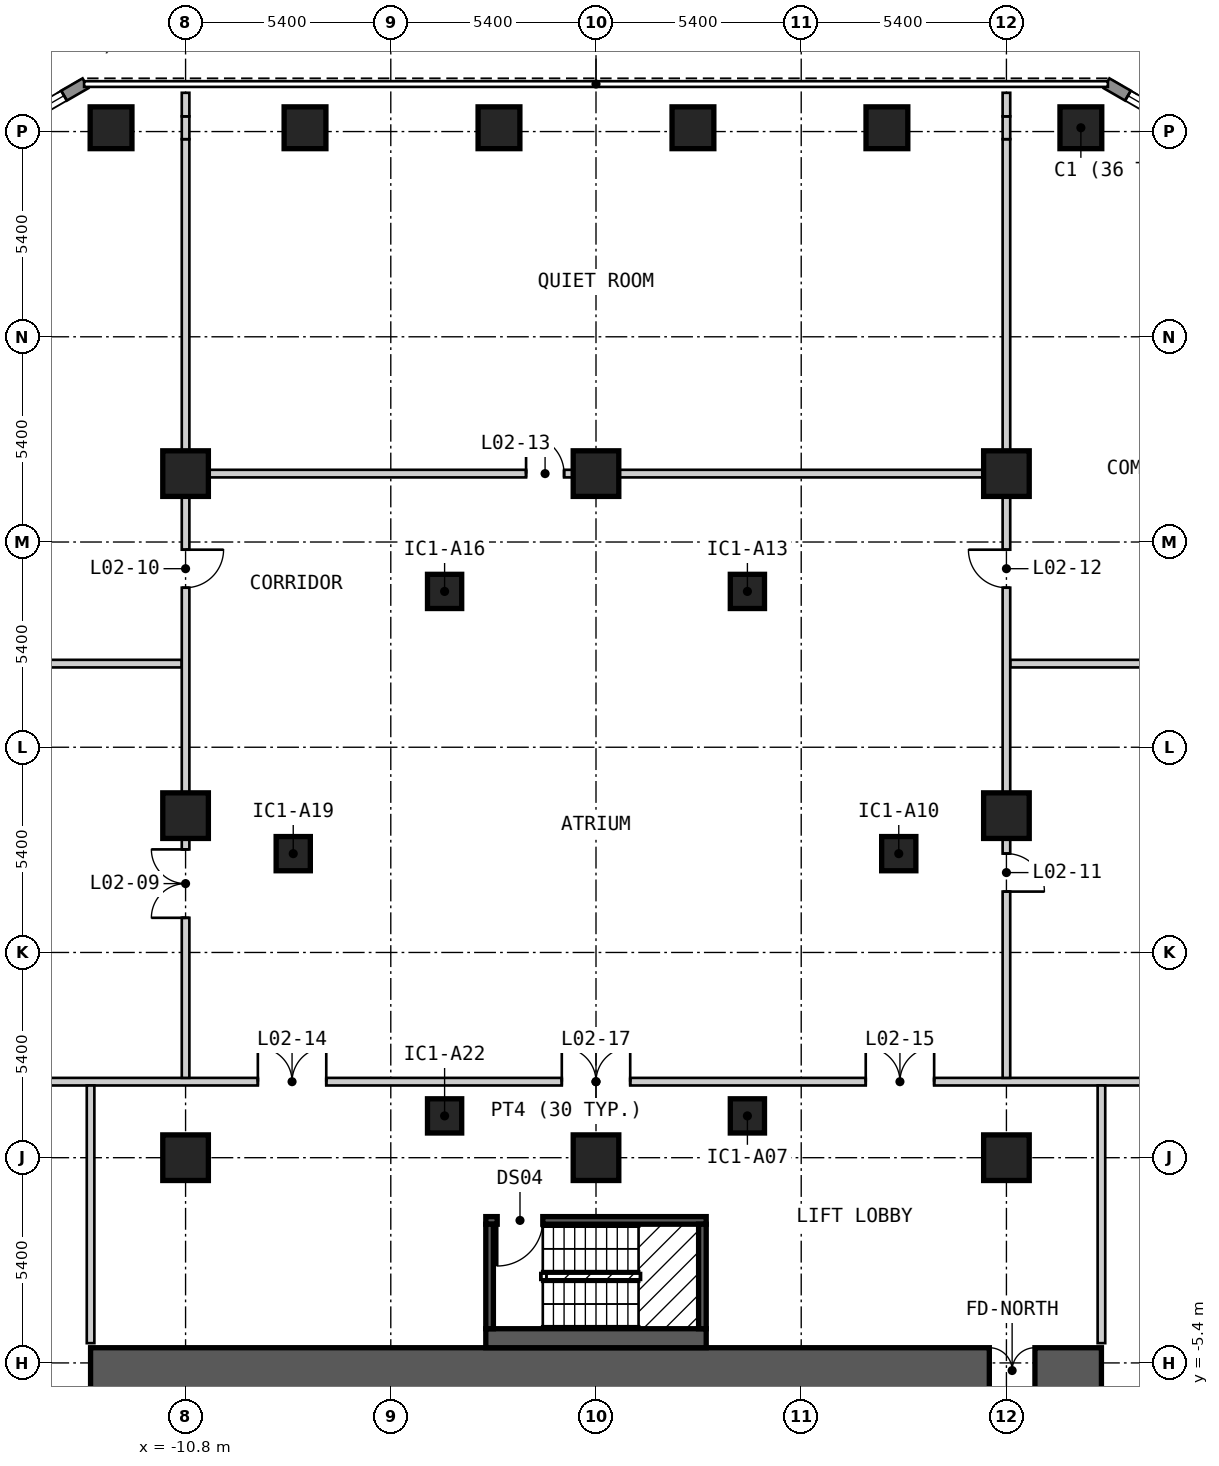
"""IFC4 building model, lengths in metres.
Left out: names, types, materials, properties, quantities, classifications, styles, units other than length and angle.
Written with IfcOpenShell. Run it as: python <this file> out.ifc"""

import sys

from ifc_helpers import new_model, si_unit, direction, frame, frame_2d, origin, origin_2d, place, context, subcontext, project, spatial, polyline, rectangle, outline, extrude, element, fill, save


model = new_model("IFC4")
c1 = context("Model", 3, precision=1e-05, world=origin(), true_north=direction((0.0, 1.0)))
c2 = subcontext(c1, "Body", "Model", "MODEL_VIEW")
j1 = project(units=[si_unit("LENGTHUNIT", "METRE"), si_unit("PLANEANGLEUNIT", "RADIAN")], contexts=[c1])
p1 = place(None, origin())
s1 = spatial("IfcSite", under=j1, at=p1, CompositionType="ELEMENT")
p2 = place(p1, origin())
s2 = spatial("IfcBuilding", under=s1, at=p2, CompositionType="ELEMENT")
p3 = place(p2, frame((0.0, 0.0, 9.0)))
s3 = spatial("IfcBuildingStorey", under=s2, at=p3, CompositionType="ELEMENT", Elevation=9.0)
for number, where, z_axis, x_axis in (
    (1, (12.759, 27.1, 0.0), (0.0, 0.0, 1.0), (-1.0, 0.0, 0.0)),
    (2, (7.655, 27.1, 0.0), (0.0, 0.0, 1.0), (-1.0, 0.0, 0.0)),
    (3, (2.551, 27.1, 0.0), (0.0, 0.0, 1.0), (-1.0, 0.0, 0.0)),
    (4, (-2.553, 27.1, 0.0), (0.0, 0.0, 1.0), (-1.0, 0.0, 0.0)),
    (5, (-7.657, 27.1, 0.0), (0.0, 0.0, 1.0), (-1.0, 0.0, 0.0)),
    (6, (-12.761, 27.1, 0.0), (0.0, 0.0, 1.0), (-1.0, 0.0, 0.0)),
):
    element("IfcColumn", number, at=place(p3, frame(where, z_axis=z_axis, x_axis=x_axis)), inside=s3, PredefinedType="COLUMN", context=c2, shape_type="SweptSolid", body=[
        extrude(rectangle(XDim=1.1, YDim=1.1, at=origin_2d()), origin(), (0.0, 0.0, 1.0), 3.6),
    ])
for number, where, z_axis, x_axis in (
    (7, (3.984, 1.1, 0.0), (0.0, 0.0, 1.0), (1.0, 0.0, 0.0)),
    (8, (7.967, 8.0, 0.0), (0.0, 0.0, 1.0), (1.0, 0.0, 0.0)),
    (9, (3.984, 14.9, 0.0), (0.0, 0.0, 1.0), (1.0, 0.0, 0.0)),
    (10, (-3.984, 14.9, 0.0), (0.0, 0.0, 1.0), (1.0, 0.0, 0.0)),
    (11, (-7.967, 8.0, 0.0), (0.0, 0.0, 1.0), (1.0, 0.0, 0.0)),
    (12, (-3.984, 1.1, 0.0), (0.0, 0.0, 1.0), (1.0, 0.0, 0.0)),
):
    element("IfcColumn", number, at=place(p3, frame(where, z_axis=z_axis, x_axis=x_axis)), inside=s3, PredefinedType="COLUMN", context=c2, shape_type="SweptSolid", body=[
        extrude(rectangle(XDim=0.9, YDim=0.9, at=origin_2d()), origin(), (0.0, 0.0, 1.0), 3.6),
    ])
for number, where, z_axis, x_axis in (
    (13, (-10.8, 0.0, 0.0), (0.0, 0.0, 1.0), (1.0, 0.0, 0.0)),
    (14, (-10.8, 9.0, 0.0), (0.0, 0.0, 1.0), (1.0, 0.0, 0.0)),
    (15, (-10.8, 18.0, 0.0), (0.0, 0.0, 1.0), (1.0, 0.0, 0.0)),
    (16, (0.0, 0.0, 0.0), (0.0, 0.0, 1.0), (1.0, 0.0, 0.0)),
    (17, (0.0, 18.0, 0.0), (0.0, 0.0, 1.0), (1.0, 0.0, 0.0)),
    (18, (10.8, 0.0, 0.0), (0.0, 0.0, 1.0), (1.0, 0.0, 0.0)),
    (19, (10.8, 9.0, 0.0), (0.0, 0.0, 1.0), (1.0, 0.0, 0.0)),
    (20, (10.8, 18.0, 0.0), (0.0, 0.0, 1.0), (1.0, 0.0, 0.0)),
):
    element("IfcColumn", number, at=place(p3, frame(where, z_axis=z_axis, x_axis=x_axis)), inside=s3, PredefinedType="COLUMN", context=c2, shape_type="SweptSolid", body=[
        extrude(rectangle(XDim=1.2, YDim=1.2, at=origin_2d()), origin(), (0.0, 0.0, 1.0), 3.6),
    ])
p4 = place(p3, frame((-13.3, -5.6, 0.0), z_axis=(0.0, 0.0, 1.0), x_axis=(1.0, 0.0, 0.0)))
e21 = element("IfcWall", 21, at=p4, inside=s3, PredefinedType="SHEAR", context=c2, shape_type="SweptSolid", body=[
    extrude(rectangle(XDim=26.6, YDim=1.2, at=frame_2d((13.3, 0.0))), origin(), (0.0, 0.0, 1.0), 3.25),
])
p5 = place(p4, frame((23.65, 0.0, 0.0)))
e22 = element("IfcOpeningElement", 22, at=p5, cuts=e21, PredefinedType="OPENING", context=c2, shape_type="SweptSolid", body=[
    extrude(rectangle(XDim=1.2, YDim=2.1, at=frame_2d((0.6, 1.05))), frame((0.0, 0.61, 0.0), z_axis=(0.0, -1.0, 0.0), x_axis=(1.0, 0.0, 0.0)), (0.0, 0.0, 1.0), 1.22),
])
p6 = place(p3, frame((-13.435, 28.27, 0.0), z_axis=(0.0, 0.0, 1.0), x_axis=(-0.866010750942, -0.50002537861, 0.0)))
e23 = element("IfcWall", 23, at=p6, inside=s3, PredefinedType="SOLIDWALL", context=c2, shape_type="SweptSolid", body=[
    extrude(outline(polyline([(0.0, -0.15), (5.0, -0.15), (4.919, 0.15), (0.08, 0.15), (0.0, -0.15)])), origin(), (0.0, 0.0, 1.0), 3.25),
])
p7 = place(p6, frame((0.65, 0.0, 0.15)))
e24 = element("IfcOpeningElement", 24, at=p7, cuts=e23, PredefinedType="OPENING", context=c2, shape_type="SweptSolid", body=[
    extrude(rectangle(XDim=1.2, YDim=2.1, at=frame_2d((0.6, 1.05))), frame((0.0, 0.16, 0.0), z_axis=(0.0, -1.0, 0.0), x_axis=(1.0, 0.0, 0.0)), (0.0, 0.0, 1.0), 0.32),
])
p8 = place(p6, frame((3.149, 0.0, 0.15)))
e25 = element("IfcOpeningElement", 25, at=p8, cuts=e23, PredefinedType="OPENING", context=c2, shape_type="SweptSolid", body=[
    extrude(rectangle(XDim=1.2, YDim=2.1, at=frame_2d((0.6, 1.05))), frame((0.0, 0.16, 0.0), z_axis=(0.0, -1.0, 0.0), x_axis=(1.0, 0.0, 0.0)), (0.0, 0.0, 1.0), 0.32),
])
p9 = place(p3, frame((17.765, 25.77, 0.0), z_axis=(0.0, 0.0, 1.0), x_axis=(-0.866010750942, 0.50002537861, 0.0)))
e26 = element("IfcWall", 26, at=p9, inside=s3, PredefinedType="SOLIDWALL", context=c2, shape_type="SweptSolid", body=[
    extrude(outline(polyline([(0.0, -0.15), (5.0, -0.15), (4.919, 0.15), (0.08, 0.15), (0.0, -0.15)])), origin(), (0.0, 0.0, 1.0), 3.25),
])
p10 = place(p9, frame((0.65, 0.0, 0.15)))
e27 = element("IfcOpeningElement", 27, at=p10, cuts=e26, PredefinedType="OPENING", context=c2, shape_type="SweptSolid", body=[
    extrude(rectangle(XDim=1.2, YDim=2.1, at=frame_2d((0.6, 1.05))), frame((0.0, 0.16, 0.0), z_axis=(0.0, -1.0, 0.0), x_axis=(1.0, 0.0, 0.0)), (0.0, 0.0, 1.0), 0.32),
])
p11 = place(p9, frame((3.15, 0.0, 0.15)))
e28 = element("IfcOpeningElement", 28, at=p11, cuts=e26, PredefinedType="OPENING", context=c2, shape_type="SweptSolid", body=[
    extrude(rectangle(XDim=1.2, YDim=2.1, at=frame_2d((0.6, 1.05))), frame((0.0, 0.16, 0.0), z_axis=(0.0, -1.0, 0.0), x_axis=(1.0, 0.0, 0.0)), (0.0, 0.0, 1.0), 0.32),
])
p12 = place(p3, frame((-2.9, -4.75, 0.0), z_axis=(0.0, 0.0, 1.0), x_axis=(1.0, 0.0, 0.0)))
e29 = element("IfcWall", 29, at=p12, inside=s3, PredefinedType="SOLIDWALL", context=c2, shape_type="SweptSolid", body=[
    extrude(rectangle(XDim=5.8, YDim=0.5, at=frame_2d((2.9, 0.0))), origin(), (0.0, 0.0, 1.0), 3.25),
])
p13 = place(p3, frame((-2.9, -1.65, 0.0), z_axis=(0.0, 0.0, 1.0), x_axis=(1.0, 0.0, 0.0)))
e30 = element("IfcWall", 30, at=p13, inside=s3, PredefinedType="SOLIDWALL", context=c2, shape_type="SweptSolid", body=[
    extrude(rectangle(XDim=5.8, YDim=0.2, at=frame_2d((2.9, 0.0))), origin(), (0.0, 0.0, 1.0), 3.25),
])
p14 = place(p13, frame((0.3, 0.0, 0.0)))
e31 = element("IfcOpeningElement", 31, at=p14, cuts=e30, PredefinedType="OPENING", context=c2, shape_type="SweptSolid", body=[
    extrude(rectangle(XDim=1.2, YDim=2.1, at=frame_2d((0.6, 1.05))), frame((0.0, 0.11, 0.0), z_axis=(0.0, -1.0, 0.0), x_axis=(1.0, 0.0, 0.0)), (0.0, 0.0, 1.0), 0.22),
])
for number, where, z_axis, x_axis in (
    (32, (-2.8, -4.5, 0.0), (0.0, 0.0, 1.0), (0.0, 1.0, 0.0)),
    (33, (2.8, -4.5, 0.0), (0.0, 0.0, 1.0), (0.0, 1.0, 0.0)),
):
    element("IfcWall", number, at=place(p3, frame(where, z_axis=z_axis, x_axis=x_axis)), inside=s3, PredefinedType="SOLIDWALL", context=c2, shape_type="SweptSolid", body=[
        extrude(rectangle(XDim=2.75, YDim=0.2, at=frame_2d((1.375, 0.0))), origin(), (0.0, 0.0, 1.0), 3.25),
    ])
p15 = place(p3, frame((-29.549, 2.0, 0.0), z_axis=(0.0, 0.0, 1.0), x_axis=(1.0, 0.0, 0.0)))
e34 = element("IfcWall", 34, at=p15, inside=s3, PredefinedType="PARTITIONING", context=c2, shape_type="SweptSolid", body=[
    extrude(rectangle(XDim=59.097, YDim=0.2, at=frame_2d((29.549, 0.0))), origin(), (0.0, 0.0, 1.0), 3.25),
])
p16 = place(p15, frame((20.651, 0.0, 0.0)))
e35 = element("IfcOpeningElement", 35, at=p16, cuts=e34, PredefinedType="OPENING", context=c2, shape_type="SweptSolid", body=[
    extrude(rectangle(XDim=1.8, YDim=2.1, at=frame_2d((0.9, 1.05))), frame((0.0, 0.11, 0.0), z_axis=(0.0, -1.0, 0.0), x_axis=(1.0, 0.0, 0.0)), (0.0, 0.0, 1.0), 0.22),
])
p17 = place(p15, frame((36.647, 0.0, 0.0)))
e36 = element("IfcOpeningElement", 36, at=p17, cuts=e34, PredefinedType="OPENING", context=c2, shape_type="SweptSolid", body=[
    extrude(rectangle(XDim=1.8, YDim=2.1, at=frame_2d((0.9, 1.05))), frame((0.0, 0.11, 0.0), z_axis=(0.0, -1.0, 0.0), x_axis=(1.0, 0.0, 0.0)), (0.0, 0.0, 1.0), 0.22),
])
p18 = place(p15, frame((28.649, 0.0, 0.0)))
e37 = element("IfcOpeningElement", 37, at=p18, cuts=e34, PredefinedType="OPENING", context=c2, shape_type="SweptSolid", body=[
    extrude(rectangle(XDim=1.8, YDim=2.1, at=frame_2d((0.9, 1.05))), frame((0.0, 0.11, 0.0), z_axis=(0.0, -1.0, 0.0), x_axis=(1.0, 0.0, 0.0)), (0.0, 0.0, 1.0), 0.22),
])
for number, where, z_axis, x_axis in (
    (38, (-23.383, 13.0, 0.0), (0.0, 0.0, 1.0), (1.0, 0.0, 0.0)),
    (39, (10.9, 13.0, 0.0), (0.0, 0.0, 1.0), (1.0, 0.0, 0.0)),
):
    element("IfcWall", number, at=place(p3, frame(where, z_axis=z_axis, x_axis=x_axis)), inside=s3, PredefinedType="PARTITIONING", context=c2, shape_type="SweptSolid", body=[
        extrude(rectangle(XDim=12.483, YDim=0.2, at=frame_2d((6.242, 0.0))), origin(), (0.0, 0.0, 1.0), 3.25),
    ])
p19 = place(p3, frame((-10.7, 18.0, 0.0), z_axis=(0.0, 0.0, 1.0), x_axis=(1.0, 0.0, 0.0)))
e40 = element("IfcWall", 40, at=p19, inside=s3, PredefinedType="PARTITIONING", context=c2, shape_type="SweptSolid", body=[
    extrude(rectangle(XDim=21.4, YDim=0.2, at=frame_2d((10.7, 0.0))), origin(), (0.0, 0.0, 1.0), 3.25),
])
p20 = place(p19, frame((8.86, 0.0, 0.0)))
e41 = element("IfcOpeningElement", 41, at=p20, cuts=e40, PredefinedType="OPENING", context=c2, shape_type="SweptSolid", body=[
    extrude(rectangle(XDim=1.0, YDim=2.1, at=frame_2d((0.5, 1.05))), frame((0.0, 0.11, 0.0), z_axis=(0.0, -1.0, 0.0), x_axis=(1.0, 0.0, 0.0)), (0.0, 0.0, 1.0), 0.22),
])
p21 = place(p3, frame((-13.3, -4.88, 0.0), z_axis=(0.0, 0.0, 1.0), x_axis=(0.0, 1.0, 0.0)))
e42 = element("IfcWall", 42, at=p21, inside=s3, PredefinedType="PARTITIONING", context=c2, shape_type="SweptSolid", body=[
    extrude(rectangle(XDim=6.78, YDim=0.2, at=frame_2d((3.39, 0.0))), origin(), (0.0, 0.0, 1.0), 3.25),
])
p22 = place(p3, frame((-10.8, 2.1, 0.0), z_axis=(0.0, 0.0, 1.0), x_axis=(0.0, 1.0, 0.0)))
e43 = element("IfcWall", 43, at=p22, inside=s3, PredefinedType="PARTITIONING", context=c2, shape_type="SweptSolid", body=[
    extrude(rectangle(XDim=24.7, YDim=0.2, at=frame_2d((12.35, 0.0))), origin(), (0.0, 0.0, 1.0), 3.25),
])
p23 = place(p22, frame((4.212, 0.0, 0.0)))
e44 = element("IfcOpeningElement", 44, at=p23, cuts=e43, PredefinedType="OPENING", context=c2, shape_type="SweptSolid", body=[
    extrude(rectangle(XDim=1.8, YDim=2.1, at=frame_2d((0.9, 1.05))), frame((0.0, 0.11, 0.0), z_axis=(0.0, -1.0, 0.0), x_axis=(1.0, 0.0, 0.0)), (0.0, 0.0, 1.0), 0.22),
])
p24 = place(p22, frame((12.898, 0.0, 0.0)))
e45 = element("IfcOpeningElement", 45, at=p24, cuts=e43, PredefinedType="OPENING", context=c2, shape_type="SweptSolid", body=[
    extrude(rectangle(XDim=1.0, YDim=2.1, at=frame_2d((0.5, 1.05))), frame((0.0, 0.11, 0.0), z_axis=(0.0, -1.0, 0.0), x_axis=(1.0, 0.0, 0.0)), (0.0, 0.0, 1.0), 0.22),
])
p25 = place(p3, frame((-10.8, 26.8, 0.0), z_axis=(0.0, 0.0, 1.0), x_axis=(0.0, 1.0, 0.0)))
e46 = element("IfcWall", 46, at=p25, inside=s3, PredefinedType="PARTITIONING", context=c2, shape_type="SweptSolid", body=[
    extrude(rectangle(XDim=0.6, YDim=0.2, at=frame_2d((0.3, 0.0))), origin(), (0.0, 0.0, 1.0), 2.52),
])
p26 = place(p3, frame((-10.8, 27.4, 0.0), z_axis=(0.0, 0.0, 1.0), x_axis=(0.0, 1.0, 0.0)))
e47 = element("IfcWall", 47, at=p26, inside=s3, PredefinedType="PARTITIONING", context=c2, shape_type="SweptSolid", body=[
    extrude(rectangle(XDim=0.62, YDim=0.2, at=frame_2d((0.31, 0.0))), origin(), (0.0, 0.0, 1.0), 3.25),
])
p27 = place(p3, frame((10.8, 2.1, 0.0), z_axis=(0.0, 0.0, 1.0), x_axis=(0.0, 1.0, 0.0)))
e48 = element("IfcWall", 48, at=p27, inside=s3, PredefinedType="PARTITIONING", context=c2, shape_type="SweptSolid", body=[
    extrude(rectangle(XDim=24.7, YDim=0.2, at=frame_2d((12.35, 0.0))), origin(), (0.0, 0.0, 1.0), 3.25),
])
p28 = place(p27, frame((5.902, 0.0, 0.0), z_axis=(0.0, 0.0, 1.0), x_axis=(-1.0, 0.0, 0.0)))
e49 = element("IfcOpeningElement", 49, at=p28, cuts=e48, PredefinedType="OPENING", context=c2, shape_type="SweptSolid", body=[
    extrude(rectangle(XDim=1.0, YDim=2.1, at=frame_2d((0.5, 1.05))), frame((0.0, 0.11, 0.0), z_axis=(0.0, -1.0, 0.0), x_axis=(1.0, 0.0, 0.0)), (0.0, 0.0, 1.0), 0.22),
])
p29 = place(p27, frame((13.898, 0.0, 0.0), z_axis=(0.0, 0.0, 1.0), x_axis=(-1.0, 0.0, 0.0)))
e50 = element("IfcOpeningElement", 50, at=p29, cuts=e48, PredefinedType="OPENING", context=c2, shape_type="SweptSolid", body=[
    extrude(rectangle(XDim=1.0, YDim=2.1, at=frame_2d((0.5, 1.05))), frame((0.0, 0.11, 0.0), z_axis=(0.0, -1.0, 0.0), x_axis=(1.0, 0.0, 0.0)), (0.0, 0.0, 1.0), 0.22),
])
p30 = place(p3, frame((10.8, 26.8, 0.0), z_axis=(0.0, 0.0, 1.0), x_axis=(0.0, 1.0, 0.0)))
e51 = element("IfcWall", 51, at=p30, inside=s3, PredefinedType="PARTITIONING", context=c2, shape_type="SweptSolid", body=[
    extrude(rectangle(XDim=0.6, YDim=0.2, at=frame_2d((0.3, 0.0))), origin(), (0.0, 0.0, 1.0), 2.52),
])
p31 = place(p3, frame((10.8, 27.4, 0.0), z_axis=(0.0, 0.0, 1.0), x_axis=(0.0, 1.0, 0.0)))
e52 = element("IfcWall", 52, at=p31, inside=s3, PredefinedType="PARTITIONING", context=c2, shape_type="SweptSolid", body=[
    extrude(rectangle(XDim=0.62, YDim=0.2, at=frame_2d((0.31, 0.0))), origin(), (0.0, 0.0, 1.0), 3.25),
])
p32 = place(p3, frame((13.3, -4.88, 0.0), z_axis=(0.0, 0.0, 1.0), x_axis=(0.0, 1.0, 0.0)))
e53 = element("IfcWall", 53, at=p32, inside=s3, PredefinedType="PARTITIONING", context=c2, shape_type="SweptSolid", body=[
    extrude(rectangle(XDim=6.78, YDim=0.2, at=frame_2d((3.39, 0.0))), origin(), (0.0, 0.0, 1.0), 3.25),
])
p33 = place(p7, origin())
e54 = element("IfcWindow", 54, at=p33, inside=s3, PartitioningType="SINGLE_PANEL", PredefinedType="WINDOW", context=c2, shape_type="SweptSolid", body=[
    extrude(rectangle(XDim=1.2, YDim=2.1, at=frame_2d((0.6, 1.05))), frame((0.0, 0.03, 0.0), z_axis=(0.0, -1.0, 0.0), x_axis=(1.0, 0.0, 0.0)), (0.0, 0.0, 1.0), 0.06),
])
fill(e24, e54)
p34 = place(p11, origin())
e55 = element("IfcWindow", 55, at=p34, inside=s3, PartitioningType="SINGLE_PANEL", PredefinedType="WINDOW", context=c2, shape_type="SweptSolid", body=[
    extrude(rectangle(XDim=1.2, YDim=2.1, at=frame_2d((0.6, 1.05))), frame((0.0, 0.03, 0.0), z_axis=(0.0, -1.0, 0.0), x_axis=(1.0, 0.0, 0.0)), (0.0, 0.0, 1.0), 0.06),
])
fill(e28, e55)
p35 = place(p14, origin())
e56 = element("IfcDoor", 56, at=p35, inside=s3, OperationType="SINGLE_SWING_LEFT", PredefinedType="DOOR", context=c2, shape_type="SweptSolid", body=[
    extrude(rectangle(XDim=1.2, YDim=2.1, at=frame_2d((0.6, 1.05))), frame((0.0, 0.025, 0.0), z_axis=(0.0, -1.0, 0.0), x_axis=(1.0, 0.0, 0.0)), (0.0, 0.0, 1.0), 0.05),
])
fill(e31, e56)
p36 = place(p23, origin())
e57 = element("IfcDoor", 57, at=p36, inside=s3, OperationType="DOUBLE_DOOR_SINGLE_SWING", PredefinedType="DOOR", context=c2, shape_type="SweptSolid", body=[
    extrude(rectangle(XDim=1.8, YDim=2.1, at=frame_2d((0.9, 1.05))), frame((0.0, 0.025, 0.0), z_axis=(0.0, -1.0, 0.0), x_axis=(1.0, 0.0, 0.0)), (0.0, 0.0, 1.0), 0.05),
])
fill(e44, e57)
p37 = place(p24, origin())
e58 = element("IfcDoor", 58, at=p37, inside=s3, OperationType="SINGLE_SWING_RIGHT", PredefinedType="DOOR", context=c2, shape_type="SweptSolid", body=[
    extrude(rectangle(XDim=1.0, YDim=2.1, at=frame_2d((0.5, 1.05))), frame((0.0, 0.025, 0.0), z_axis=(0.0, -1.0, 0.0), x_axis=(1.0, 0.0, 0.0)), (0.0, 0.0, 1.0), 0.05),
])
fill(e45, e58)
p38 = place(p28, origin())
e59 = element("IfcDoor", 59, at=p38, inside=s3, OperationType="SINGLE_SWING_RIGHT", PredefinedType="DOOR", context=c2, shape_type="SweptSolid", body=[
    extrude(rectangle(XDim=1.0, YDim=2.1, at=frame_2d((0.5, 1.05))), frame((0.0, 0.025, 0.0), z_axis=(0.0, -1.0, 0.0), x_axis=(1.0, 0.0, 0.0)), (0.0, 0.0, 1.0), 0.05),
])
fill(e49, e59)
p39 = place(p29, origin())
e60 = element("IfcDoor", 60, at=p39, inside=s3, OperationType="SINGLE_SWING_LEFT", PredefinedType="DOOR", context=c2, shape_type="SweptSolid", body=[
    extrude(rectangle(XDim=1.0, YDim=2.1, at=frame_2d((0.5, 1.05))), frame((0.0, 0.025, 0.0), z_axis=(0.0, -1.0, 0.0), x_axis=(1.0, 0.0, 0.0)), (0.0, 0.0, 1.0), 0.05),
])
fill(e50, e60)
p40 = place(p20, origin())
e61 = element("IfcDoor", 61, at=p40, inside=s3, OperationType="SINGLE_SWING_LEFT", PredefinedType="DOOR", context=c2, shape_type="SweptSolid", body=[
    extrude(rectangle(XDim=1.0, YDim=2.1, at=frame_2d((0.5, 1.05))), frame((0.0, 0.025, 0.0), z_axis=(0.0, -1.0, 0.0), x_axis=(1.0, 0.0, 0.0)), (0.0, 0.0, 1.0), 0.05),
])
fill(e41, e61)
p41 = place(p16, origin())
e62 = element("IfcDoor", 62, at=p41, inside=s3, OperationType="DOUBLE_DOOR_SINGLE_SWING", PredefinedType="DOOR", context=c2, shape_type="SweptSolid", body=[
    extrude(rectangle(XDim=1.8, YDim=2.1, at=frame_2d((0.9, 1.05))), frame((0.0, 0.025, 0.0), z_axis=(0.0, -1.0, 0.0), x_axis=(1.0, 0.0, 0.0)), (0.0, 0.0, 1.0), 0.05),
])
fill(e35, e62)
p42 = place(p17, origin())
e63 = element("IfcDoor", 63, at=p42, inside=s3, OperationType="DOUBLE_DOOR_SINGLE_SWING", PredefinedType="DOOR", context=c2, shape_type="SweptSolid", body=[
    extrude(rectangle(XDim=1.8, YDim=2.1, at=frame_2d((0.9, 1.05))), frame((0.0, 0.025, 0.0), z_axis=(0.0, -1.0, 0.0), x_axis=(1.0, 0.0, 0.0)), (0.0, 0.0, 1.0), 0.05),
])
fill(e36, e63)
p43 = place(p18, origin())
e64 = element("IfcDoor", 64, at=p43, inside=s3, OperationType="DOUBLE_DOOR_SINGLE_SWING", PredefinedType="DOOR", context=c2, shape_type="SweptSolid", body=[
    extrude(rectangle(XDim=1.8, YDim=2.1, at=frame_2d((0.9, 1.05))), frame((0.0, 0.025, 0.0), z_axis=(0.0, -1.0, 0.0), x_axis=(1.0, 0.0, 0.0)), (0.0, 0.0, 1.0), 0.05),
])
fill(e37, e64)
p44 = place(p5, origin())
e65 = element("IfcDoor", 65, at=p44, inside=s3, OperationType="DOUBLE_DOOR_SINGLE_SWING", PredefinedType="DOOR", context=c2, shape_type="SweptSolid", body=[
    extrude(rectangle(XDim=1.2, YDim=2.1, at=frame_2d((0.6, 1.05))), frame((0.0, 0.025, 0.0), z_axis=(0.0, -1.0, 0.0), x_axis=(1.0, 0.0, 0.0)), (0.0, 0.0, 1.0), 0.05),
])
fill(e22, e65)
save(model, sys.argv[1])
